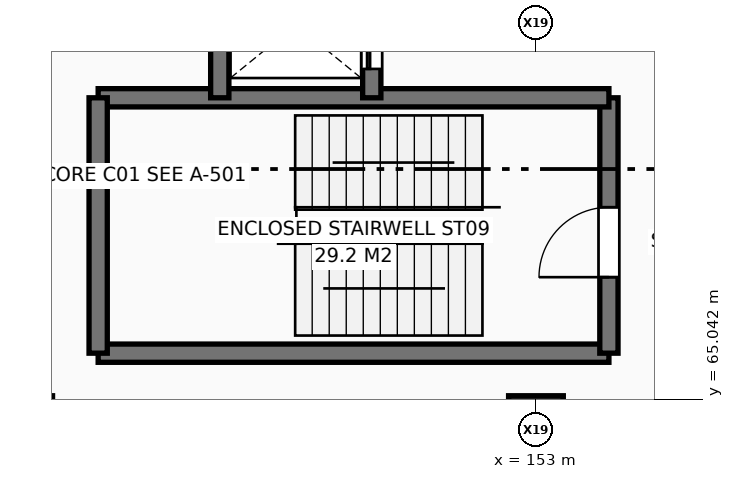
"""IFC4 building model, lengths in metres.
Left out: names, types, materials, properties, quantities, classifications, styles, units other than length and angle.
Written with IfcOpenShell. Run it as: python <this file> out.ifc"""

import sys

from ifc_helpers import new_model, si_unit, direction, frame, frame_2d, origin, origin_2d, place, context, subcontext, project, spatial, rectangle, extrude, element, fill, save


model = new_model("IFC4")
c1 = context("Model", 3, precision=1e-05, world=origin(), true_north=direction((0.0, 1.0)))
c2 = subcontext(c1, "Body", "Model", "MODEL_VIEW")
j1 = project(units=[si_unit("LENGTHUNIT", "METRE"), si_unit("PLANEANGLEUNIT", "RADIAN")], contexts=[c1])
p1 = place(None, origin())
s1 = spatial("IfcSite", under=j1, at=p1, CompositionType="ELEMENT")
p2 = place(p1, origin())
s2 = spatial("IfcBuilding", under=s1, at=p2, CompositionType="ELEMENT")
p3 = place(p2, frame((0.0, 0.0, -4.2)))
s3 = spatial("IfcBuildingStorey", under=s2, at=p3, CompositionType="ELEMENT", Elevation=-4.2)
p4 = place(p3, frame((153.0, 64.8, 0.0), z_axis=(0.0, 0.0, 1.0), x_axis=(1.0, 0.0, 0.0)))
e1 = element("IfcColumn", 1, at=p4, inside=s3, PredefinedType="COLUMN", context=c2, shape_type="SweptSolid", body=[
    extrude(rectangle(XDim=0.9, YDim=0.6, at=origin_2d()), origin(), (0.0, 0.0, 1.0), 4.2),
])
p5 = place(p3, frame((145.8, 65.8, 0.0), z_axis=(0.0, 0.0, 1.0), x_axis=(1.0, 0.0, 0.0)))
e2 = element("IfcWall", 2, at=p5, inside=s3, PredefinedType="SHEAR", context=c2, shape_type="SweptSolid", body=[
    extrude(rectangle(XDim=8.4, YDim=0.3, at=frame_2d((4.2, 0.0))), origin(), (0.0, 0.0, 1.0), 3.92),
])
p6 = place(p3, frame((154.2, 65.8, 0.0), z_axis=(0.0, 0.0, 1.0), x_axis=(0.0, 1.0, 0.0)))
e3 = element("IfcWall", 3, at=p6, inside=s3, PredefinedType="SHEAR", context=c2, shape_type="SweptSolid", body=[
    extrude(rectangle(XDim=4.2, YDim=0.3, at=frame_2d((2.1, 0.0))), origin(), (0.0, 0.0, 1.0), 3.92),
])
p7 = place(p6, frame((1.25, 0.0, 0.0)))
e4 = element("IfcOpeningElement", 4, at=p7, cuts=e3, PredefinedType="OPENING", context=c2, shape_type="SweptSolid", body=[
    extrude(rectangle(XDim=1.15, YDim=2.2, at=frame_2d((0.575, 1.1))), frame((0.0, 0.16, 0.0), z_axis=(0.0, -1.0, 0.0), x_axis=(1.0, 0.0, 0.0)), (0.0, 0.0, 1.0), 0.32),
])
p8 = place(p3, frame((154.2, 70.0, 0.0), z_axis=(0.0, 0.0, 1.0), x_axis=(-1.0, 0.0, 0.0)))
e5 = element("IfcWall", 5, at=p8, inside=s3, PredefinedType="SHEAR", context=c2, shape_type="SweptSolid", body=[
    extrude(rectangle(XDim=8.4, YDim=0.3, at=frame_2d((4.2, 0.0))), origin(), (0.0, 0.0, 1.0), 3.92),
])
p9 = place(p3, frame((145.8, 70.0, 0.0), z_axis=(0.0, 0.0, 1.0), x_axis=(0.0, -1.0, 0.0)))
e6 = element("IfcWall", 6, at=p9, inside=s3, PredefinedType="SHEAR", context=c2, shape_type="SweptSolid", body=[
    extrude(rectangle(XDim=4.2, YDim=0.3, at=frame_2d((2.1, 0.0))), origin(), (0.0, 0.0, 1.0), 3.92),
])
p10 = place(p3, frame((147.8, 72.4, 0.0), z_axis=(0.0, 0.0, 1.0), x_axis=(0.0, -1.0, 0.0)))
e7 = element("IfcWall", 7, at=p10, inside=s3, PredefinedType="SHEAR", context=c2, shape_type="SweptSolid", body=[
    extrude(rectangle(XDim=2.4, YDim=0.3, at=frame_2d((1.2, 0.0))), origin(), (0.0, 0.0, 1.0), 3.92),
])
p11 = place(p3, frame((150.3, 70.0, 0.0), z_axis=(0.0, 0.0, 1.0), x_axis=(0.0, 1.0, 0.0)))
e8 = element("IfcWall", 8, at=p11, inside=s3, PredefinedType="SHEAR", context=c2, shape_type="SweptSolid", body=[
    extrude(rectangle(XDim=2.4, YDim=0.3, at=frame_2d((1.2, 0.0))), origin(), (0.0, 0.0, 1.0), 3.92),
])
p12 = place(p11, frame((0.475, 0.0, 0.0)))
e9 = element("IfcOpeningElement", 9, at=p12, cuts=e8, PredefinedType="OPENING", context=c2, shape_type="SweptSolid", body=[
    extrude(rectangle(XDim=1.45, YDim=2.35, at=frame_2d((0.725, 1.175))), frame((0.0, 0.16, 0.0), z_axis=(0.0, -1.0, 0.0), x_axis=(1.0, 0.0, 0.0)), (0.0, 0.0, 1.0), 0.32),
])
p13 = place(p7, origin())
e10 = element("IfcDoor", 10, at=p13, inside=s3, OperationType="SINGLE_SWING_LEFT", PredefinedType="DOOR", context=c2, shape_type="SweptSolid", body=[
    extrude(rectangle(XDim=1.15, YDim=2.2, at=frame_2d((0.575, 1.1))), frame((0.0, 0.025, 0.0), z_axis=(0.0, -1.0, 0.0), x_axis=(1.0, 0.0, 0.0)), (0.0, 0.0, 1.0), 0.05),
])
fill(e4, e10)
p14 = place(p12, origin())
e11 = element("IfcDoor", 11, at=p14, inside=s3, OperationType="SLIDING_TO_LEFT", PredefinedType="DOOR", context=c2, shape_type="SweptSolid", body=[
    extrude(rectangle(XDim=1.45, YDim=2.35, at=frame_2d((0.725, 1.175))), frame((0.0, 0.025, 0.0), z_axis=(0.0, -1.0, 0.0), x_axis=(1.0, 0.0, 0.0)), (0.0, 0.0, 1.0), 0.05),
])
fill(e9, e11)
save(model, sys.argv[1])
